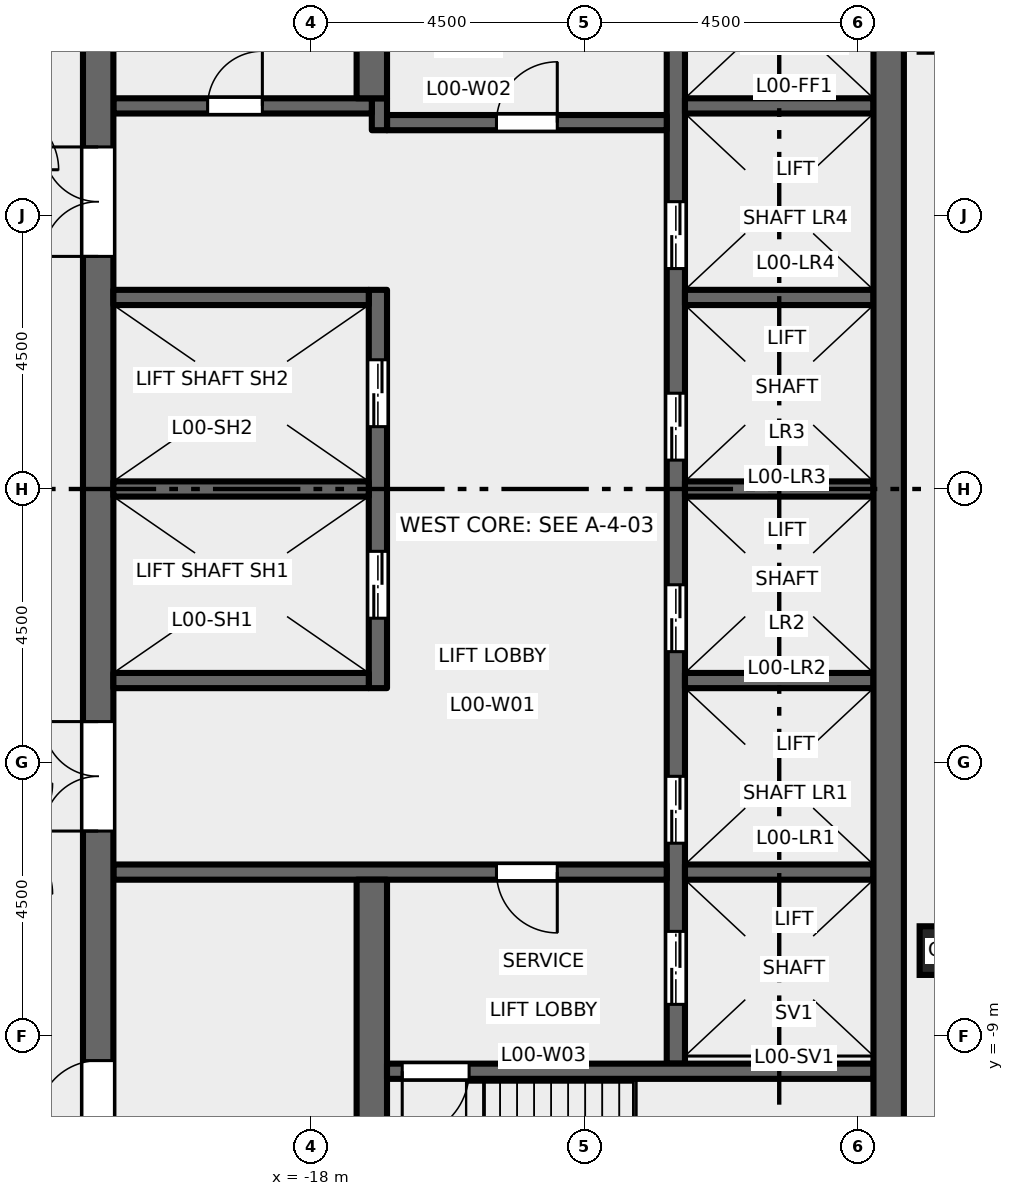
"""IFC4 building model, lengths in metres.
Left out: names, types, materials, properties, quantities, classifications, styles, units other than length and angle.
Written with IfcOpenShell. Run it as: python <this file> out.ifc"""

import sys

from ifc_helpers import new_model, si_unit, direction, frame, frame_2d, origin, origin_2d, place, context, subcontext, project, spatial, rectangle, hollow_rectangle, extrude, element, fill, save


model = new_model("IFC4")
c1 = context("Model", 3, precision=1e-05, world=origin(), true_north=direction((0.0, 1.0)))
c2 = subcontext(c1, "Body", "Model", "MODEL_VIEW")
j1 = project(units=[si_unit("LENGTHUNIT", "METRE"), si_unit("PLANEANGLEUNIT", "RADIAN")], contexts=[c1])
p1 = place(None, origin())
s1 = spatial("IfcSite", under=j1, at=p1, CompositionType="ELEMENT")
p2 = place(p1, origin())
s2 = spatial("IfcBuilding", under=s1, at=p2, CompositionType="ELEMENT")
p3 = place(p2, origin())
s3 = spatial("IfcBuildingStorey", under=s2, at=p3, CompositionType="ELEMENT", Elevation=0.0)
p4 = place(p3, frame((-7.591, -7.591, 0.0), z_axis=(0.0, 0.0, 1.0), x_axis=(1.0, 0.0, 0.0)))
e1 = element("IfcColumn", 1, at=p4, inside=s3, PredefinedType="COLUMN", context=c2, shape_type="SweptSolid", body=[
    extrude(hollow_rectangle(XDim=0.8, YDim=0.8, WallThickness=0.05, at=origin_2d()), origin(), (0.0, 0.0, 1.0), 7.2),
])
p5 = place(p3, frame((-12.0, -9.45, 0.0), z_axis=(0.0, 0.0, 1.0), x_axis=(0.0, 1.0, 0.0)))
e2 = element("IfcWall", 2, at=p5, inside=s3, PredefinedType="SHEAR", context=c2, shape_type="SweptSolid", body=[
    extrude(rectangle(XDim=18.9, YDim=0.3, at=frame_2d((9.45, 0.0))), origin(), (0.0, 0.0, 1.0), 7.0),
])
p6 = place(p5, frame((3.625, 0.0, 0.0)))
e3 = element("IfcOpeningElement", 3, at=p6, cuts=e2, PredefinedType="OPENING", context=c2, shape_type="SweptSolid", body=[
    extrude(rectangle(XDim=1.1, YDim=2.1, at=frame_2d((0.55, 1.05))), frame((0.0, 0.16, 0.0), z_axis=(0.0, -1.0, 0.0), x_axis=(1.0, 0.0, 0.0)), (0.0, 0.0, 1.0), 0.32),
])
p7 = place(p5, frame((6.775, 0.0, 0.0)))
e4 = element("IfcOpeningElement", 4, at=p7, cuts=e2, PredefinedType="OPENING", context=c2, shape_type="SweptSolid", body=[
    extrude(rectangle(XDim=1.1, YDim=2.1, at=frame_2d((0.55, 1.05))), frame((0.0, 0.16, 0.0), z_axis=(0.0, -1.0, 0.0), x_axis=(1.0, 0.0, 0.0)), (0.0, 0.0, 1.0), 0.32),
])
p8 = place(p5, frame((9.925, 0.0, 0.0)))
e5 = element("IfcOpeningElement", 5, at=p8, cuts=e2, PredefinedType="OPENING", context=c2, shape_type="SweptSolid", body=[
    extrude(rectangle(XDim=1.1, YDim=2.1, at=frame_2d((0.55, 1.05))), frame((0.0, 0.16, 0.0), z_axis=(0.0, -1.0, 0.0), x_axis=(1.0, 0.0, 0.0)), (0.0, 0.0, 1.0), 0.32),
])
p9 = place(p5, frame((13.075, 0.0, 0.0)))
e6 = element("IfcOpeningElement", 6, at=p9, cuts=e2, PredefinedType="OPENING", context=c2, shape_type="SweptSolid", body=[
    extrude(rectangle(XDim=1.1, YDim=2.1, at=frame_2d((0.55, 1.05))), frame((0.0, 0.16, 0.0), z_axis=(0.0, -1.0, 0.0), x_axis=(1.0, 0.0, 0.0)), (0.0, 0.0, 1.0), 0.32),
])
p10 = place(p5, frame((16.725, 0.0, 0.0)))
e7 = element("IfcOpeningElement", 7, at=p10, cuts=e2, PredefinedType="OPENING", context=c2, shape_type="SweptSolid", body=[
    extrude(rectangle(XDim=1.2, YDim=2.1, at=frame_2d((0.6, 1.05))), frame((0.0, 0.16, 0.0), z_axis=(0.0, -1.0, 0.0), x_axis=(1.0, 0.0, 0.0)), (0.0, 0.0, 1.0), 0.32),
])
p11 = place(p5, frame((0.975, 0.0, 0.0)))
e8 = element("IfcOpeningElement", 8, at=p11, cuts=e2, PredefinedType="OPENING", context=c2, shape_type="SweptSolid", body=[
    extrude(rectangle(XDim=1.2, YDim=2.1, at=frame_2d((0.6, 1.05))), frame((0.0, 0.16, 0.0), z_axis=(0.0, -1.0, 0.0), x_axis=(1.0, 0.0, 0.0)), (0.0, 0.0, 1.0), 0.32),
])
p12 = place(p3, frame((-12.15, 6.025, 0.0), z_axis=(0.0, 0.0, 1.0), x_axis=(-1.0, 0.0, 0.0)))
e9 = element("IfcWall", 9, at=p12, inside=s3, PredefinedType="SHEAR", context=c2, shape_type="SweptSolid", body=[
    extrude(rectangle(XDim=4.6, YDim=0.25, at=frame_2d((2.3, 0.0))), origin(), (0.0, 0.0, 1.0), 7.0),
])
p13 = place(p12, frame((1.8, 0.0, 0.0)))
e10 = element("IfcOpeningElement", 10, at=p13, cuts=e9, PredefinedType="OPENING", context=c2, shape_type="SweptSolid", body=[
    extrude(rectangle(XDim=1.0, YDim=2.1, at=frame_2d((0.5, 1.05))), frame((0.0, 0.135, 0.0), z_axis=(0.0, -1.0, 0.0), x_axis=(1.0, 0.0, 0.0)), (0.0, 0.0, 1.0), 0.27),
])
p14 = place(p3, frame((-16.875, 5.9, 0.0), z_axis=(0.0, 0.0, 1.0), x_axis=(0.0, 1.0, 0.0)))
e11 = element("IfcWall", 11, at=p14, inside=s3, PredefinedType="SHEAR", context=c2, shape_type="SweptSolid", body=[
    extrude(rectangle(XDim=0.525, YDim=0.25, at=frame_2d((0.263, 0.0))), origin(), (0.0, 0.0, 1.0), 7.0),
])
p15 = place(p3, frame((-17.0, 6.3, 0.0), z_axis=(0.0, 0.0, 1.0), x_axis=(-1.0, 0.0, 0.0)))
e12 = element("IfcWall", 12, at=p15, inside=s3, PredefinedType="SHEAR", context=c2, shape_type="SweptSolid", body=[
    extrude(rectangle(XDim=4.25, YDim=0.25, at=frame_2d((2.125, 0.0))), origin(), (0.0, 0.0, 1.0), 7.0),
])
p16 = place(p15, frame((1.8, 0.0, 0.0)))
e13 = element("IfcOpeningElement", 13, at=p16, cuts=e12, PredefinedType="OPENING", context=c2, shape_type="SweptSolid", body=[
    extrude(rectangle(XDim=0.9, YDim=2.1, at=frame_2d((0.45, 1.05))), frame((0.0, 0.135, 0.0), z_axis=(0.0, -1.0, 0.0), x_axis=(1.0, 0.0, 0.0)), (0.0, 0.0, 1.0), 0.27),
])
p17 = place(p3, frame((-12.15, -6.3, 0.0), z_axis=(0.0, 0.0, 1.0), x_axis=(-1.0, 0.0, 0.0)))
e14 = element("IfcWall", 14, at=p17, inside=s3, PredefinedType="SHEAR", context=c2, shape_type="SweptSolid", body=[
    extrude(rectangle(XDim=9.1, YDim=0.25, at=frame_2d((4.55, 0.0))), origin(), (0.0, 0.0, 1.0), 7.0),
])
p18 = place(p17, frame((1.8, 0.0, 0.0)))
e15 = element("IfcOpeningElement", 15, at=p18, cuts=e14, PredefinedType="OPENING", context=c2, shape_type="SweptSolid", body=[
    extrude(rectangle(XDim=1.0, YDim=2.1, at=frame_2d((0.5, 1.05))), frame((0.0, 0.135, 0.0), z_axis=(0.0, -1.0, 0.0), x_axis=(1.0, 0.0, 0.0)), (0.0, 0.0, 1.0), 0.27),
])
p19 = place(p3, frame((-21.5, -13.0, 0.0), z_axis=(0.0, 0.0, 1.0), x_axis=(0.0, 1.0, 0.0)))
e16 = element("IfcWall", 16, at=p19, inside=s3, PredefinedType="SHEAR", context=c2, shape_type="SweptSolid", body=[
    extrude(rectangle(XDim=26.0, YDim=0.5, at=frame_2d((13.0, 0.0))), origin(), (0.0, 0.0, 1.0), 7.0),
])
p20 = place(p19, frame((16.825, 0.0, 0.0)))
e17 = element("IfcOpeningElement", 17, at=p20, cuts=e16, PredefinedType="OPENING", context=c2, shape_type="SweptSolid", body=[
    extrude(rectangle(XDim=1.8, YDim=2.1, at=frame_2d((0.9, 1.05))), frame((0.0, 0.26, 0.0), z_axis=(0.0, -1.0, 0.0), x_axis=(1.0, 0.0, 0.0)), (0.0, 0.0, 1.0), 0.52),
])
p21 = place(p19, frame((7.375, 0.0, 0.0)))
e18 = element("IfcOpeningElement", 18, at=p21, cuts=e16, PredefinedType="OPENING", context=c2, shape_type="SweptSolid", body=[
    extrude(rectangle(XDim=1.8, YDim=2.1, at=frame_2d((0.9, 1.05))), frame((0.0, 0.26, 0.0), z_axis=(0.0, -1.0, 0.0), x_axis=(1.0, 0.0, 0.0)), (0.0, 0.0, 1.0), 0.52),
])
p22 = place(p19, frame((2.6, 0.0, 0.0)))
e19 = element("IfcOpeningElement", 19, at=p22, cuts=e16, PredefinedType="OPENING", context=c2, shape_type="SweptSolid", body=[
    extrude(rectangle(XDim=1.0, YDim=2.1, at=frame_2d((0.5, 1.05))), frame((0.0, 0.26, 0.0), z_axis=(0.0, -1.0, 0.0), x_axis=(1.0, 0.0, 0.0)), (0.0, 0.0, 1.0), 0.52),
])
p23 = place(p3, frame((-16.9, -3.275, 0.0), z_axis=(0.0, 0.0, 1.0), x_axis=(0.0, 1.0, 0.0)))
e20 = element("IfcWall", 20, at=p23, inside=s3, PredefinedType="SHEAR", context=c2, shape_type="SweptSolid", body=[
    extrude(rectangle(XDim=6.55, YDim=0.3, at=frame_2d((3.275, 0.0))), origin(), (0.0, 0.0, 1.0), 7.0),
])
p24 = place(p23, frame((1.15, 0.0, 0.0)))
e21 = element("IfcOpeningElement", 21, at=p24, cuts=e20, PredefinedType="OPENING", context=c2, shape_type="SweptSolid", body=[
    extrude(rectangle(XDim=1.1, YDim=2.1, at=frame_2d((0.55, 1.05))), frame((0.0, 0.16, 0.0), z_axis=(0.0, -1.0, 0.0), x_axis=(1.0, 0.0, 0.0)), (0.0, 0.0, 1.0), 0.32),
])
p25 = place(p23, frame((4.3, 0.0, 0.0)))
e22 = element("IfcOpeningElement", 22, at=p25, cuts=e20, PredefinedType="OPENING", context=c2, shape_type="SweptSolid", body=[
    extrude(rectangle(XDim=1.1, YDim=2.1, at=frame_2d((0.55, 1.05))), frame((0.0, 0.16, 0.0), z_axis=(0.0, -1.0, 0.0), x_axis=(1.0, 0.0, 0.0)), (0.0, 0.0, 1.0), 0.32),
])
for number, where, z_axis, x_axis in (
    (23, (-17.05, 0.0, 0.0), (0.0, 0.0, 1.0), (-1.0, 0.0, 0.0)),
    (24, (-17.05, 3.15, 0.0), (0.0, 0.0, 1.0), (-1.0, 0.0, 0.0)),
    (25, (-17.05, -3.15, 0.0), (0.0, 0.0, 1.0), (-1.0, 0.0, 0.0)),
):
    element("IfcWall", number, at=place(p3, frame(where, z_axis=z_axis, x_axis=x_axis)), inside=s3, PredefinedType="SHEAR", context=c2, shape_type="SweptSolid", body=[
        extrude(rectangle(XDim=4.2, YDim=0.25, at=frame_2d((2.1, 0.0))), origin(), (0.0, 0.0, 1.0), 7.0),
    ])
for number, where, z_axis, x_axis in (
    (26, (-17.0, 6.425, 0.0), (0.0, 0.0, 1.0), (0.0, 1.0, 0.0)),
    (27, (-17.0, -13.0, 0.0), (0.0, 0.0, 1.0), (0.0, 1.0, 0.0)),
):
    element("IfcWall", number, at=place(p3, frame(where, z_axis=z_axis, x_axis=x_axis)), inside=s3, PredefinedType="SHEAR", context=c2, shape_type="SweptSolid", body=[
        extrude(rectangle(XDim=6.575, YDim=0.5, at=frame_2d((3.288, 0.0))), origin(), (0.0, 0.0, 1.0), 7.0),
    ])
for number, where, z_axis, x_axis in (
    (28, (-8.75, 0.0, 0.0), (0.0, 0.0, 1.0), (-1.0, 0.0, 0.0)),
    (29, (-8.75, 3.15, 0.0), (0.0, 0.0, 1.0), (-1.0, 0.0, 0.0)),
    (30, (-8.75, 6.3, 0.0), (0.0, 0.0, 1.0), (-1.0, 0.0, 0.0)),
    (31, (-8.75, -3.15, 0.0), (0.0, 0.0, 1.0), (-1.0, 0.0, 0.0)),
    (32, (-8.75, -6.3, 0.0), (0.0, 0.0, 1.0), (-1.0, 0.0, 0.0)),
):
    element("IfcWall", number, at=place(p3, frame(where, z_axis=z_axis, x_axis=x_axis)), inside=s3, PredefinedType="SHEAR", context=c2, shape_type="SweptSolid", body=[
        extrude(rectangle(XDim=3.1, YDim=0.25, at=frame_2d((1.55, 0.0))), origin(), (0.0, 0.0, 1.0), 7.0),
    ])
p26 = place(p3, frame((-8.75, -9.575, 0.0), z_axis=(0.0, 0.0, 1.0), x_axis=(-1.0, 0.0, 0.0)))
e33 = element("IfcWall", 33, at=p26, inside=s3, PredefinedType="SHEAR", context=c2, shape_type="SweptSolid", body=[
    extrude(rectangle(XDim=8.0, YDim=0.25, at=frame_2d((4.0, 0.0))), origin(), (0.0, 0.0, 1.0), 7.0),
])
p27 = place(p26, frame((6.65, 0.0, 0.0)))
e34 = element("IfcOpeningElement", 34, at=p27, cuts=e33, PredefinedType="OPENING", context=c2, shape_type="SweptSolid", body=[
    extrude(rectangle(XDim=1.1, YDim=2.1, at=frame_2d((0.55, 1.05))), frame((0.0, 0.135, 0.0), z_axis=(0.0, -1.0, 0.0), x_axis=(1.0, 0.0, 0.0)), (0.0, 0.0, 1.0), 0.27),
])
p28 = place(p3, frame((-8.5, -13.0, 0.0), z_axis=(0.0, 0.0, 1.0), x_axis=(0.0, 1.0, 0.0)))
e35 = element("IfcWall", 35, at=p28, inside=s3, PredefinedType="SHEAR", context=c2, shape_type="SweptSolid", body=[
    extrude(rectangle(XDim=26.0, YDim=0.5, at=frame_2d((13.0, 0.0))), origin(), (0.0, 0.0, 1.0), 7.0),
])
p29 = place(p13, origin())
e36 = element("IfcDoor", 36, at=p29, inside=s3, OperationType="SINGLE_SWING_LEFT", PredefinedType="DOOR", context=c2, shape_type="SweptSolid", body=[
    extrude(rectangle(XDim=1.0, YDim=2.1, at=frame_2d((0.5, 1.05))), frame((0.0, 0.025, 0.0), z_axis=(0.0, -1.0, 0.0), x_axis=(1.0, 0.0, 0.0)), (0.0, 0.0, 1.0), 0.05),
])
fill(e10, e36)
p30 = place(p18, origin())
e37 = element("IfcDoor", 37, at=p30, inside=s3, OperationType="SINGLE_SWING_RIGHT", PredefinedType="DOOR", context=c2, shape_type="SweptSolid", body=[
    extrude(rectangle(XDim=1.0, YDim=2.1, at=frame_2d((0.5, 1.05))), frame((0.0, 0.025, 0.0), z_axis=(0.0, -1.0, 0.0), x_axis=(1.0, 0.0, 0.0)), (0.0, 0.0, 1.0), 0.05),
])
fill(e15, e37)
p31 = place(p27, origin())
e38 = element("IfcDoor", 38, at=p31, inside=s3, OperationType="SINGLE_SWING_LEFT", PredefinedType="DOOR", context=c2, shape_type="SweptSolid", body=[
    extrude(rectangle(XDim=1.1, YDim=2.1, at=frame_2d((0.55, 1.05))), frame((0.0, 0.025, 0.0), z_axis=(0.0, -1.0, 0.0), x_axis=(1.0, 0.0, 0.0)), (0.0, 0.0, 1.0), 0.05),
])
fill(e34, e38)
p32 = place(p20, origin())
e39 = element("IfcDoor", 39, at=p32, inside=s3, OperationType="DOUBLE_DOOR_DOUBLE_SWING", PredefinedType="DOOR", context=c2, shape_type="SweptSolid", body=[
    extrude(rectangle(XDim=1.8, YDim=2.1, at=frame_2d((0.9, 1.05))), frame((0.0, 0.025, 0.0), z_axis=(0.0, -1.0, 0.0), x_axis=(1.0, 0.0, 0.0)), (0.0, 0.0, 1.0), 0.05),
])
fill(e17, e39)
p33 = place(p21, origin())
e40 = element("IfcDoor", 40, at=p33, inside=s3, OperationType="DOUBLE_DOOR_DOUBLE_SWING", PredefinedType="DOOR", context=c2, shape_type="SweptSolid", body=[
    extrude(rectangle(XDim=1.8, YDim=2.1, at=frame_2d((0.9, 1.05))), frame((0.0, 0.025, 0.0), z_axis=(0.0, -1.0, 0.0), x_axis=(1.0, 0.0, 0.0)), (0.0, 0.0, 1.0), 0.05),
])
fill(e18, e40)
p34 = place(p6, origin())
e41 = element("IfcDoor", 41, at=p34, inside=s3, OperationType="DOUBLE_DOOR_SLIDING", PredefinedType="DOOR", context=c2, shape_type="SweptSolid", body=[
    extrude(rectangle(XDim=1.1, YDim=2.1, at=frame_2d((0.55, 1.05))), frame((0.0, 0.025, 0.0), z_axis=(0.0, -1.0, 0.0), x_axis=(1.0, 0.0, 0.0)), (0.0, 0.0, 1.0), 0.05),
])
fill(e3, e41)
p35 = place(p7, origin())
e42 = element("IfcDoor", 42, at=p35, inside=s3, OperationType="DOUBLE_DOOR_SLIDING", PredefinedType="DOOR", context=c2, shape_type="SweptSolid", body=[
    extrude(rectangle(XDim=1.1, YDim=2.1, at=frame_2d((0.55, 1.05))), frame((0.0, 0.025, 0.0), z_axis=(0.0, -1.0, 0.0), x_axis=(1.0, 0.0, 0.0)), (0.0, 0.0, 1.0), 0.05),
])
fill(e4, e42)
p36 = place(p8, origin())
e43 = element("IfcDoor", 43, at=p36, inside=s3, OperationType="DOUBLE_DOOR_SLIDING", PredefinedType="DOOR", context=c2, shape_type="SweptSolid", body=[
    extrude(rectangle(XDim=1.1, YDim=2.1, at=frame_2d((0.55, 1.05))), frame((0.0, 0.025, 0.0), z_axis=(0.0, -1.0, 0.0), x_axis=(1.0, 0.0, 0.0)), (0.0, 0.0, 1.0), 0.05),
])
fill(e5, e43)
p37 = place(p9, origin())
e44 = element("IfcDoor", 44, at=p37, inside=s3, OperationType="DOUBLE_DOOR_SLIDING", PredefinedType="DOOR", context=c2, shape_type="SweptSolid", body=[
    extrude(rectangle(XDim=1.1, YDim=2.1, at=frame_2d((0.55, 1.05))), frame((0.0, 0.025, 0.0), z_axis=(0.0, -1.0, 0.0), x_axis=(1.0, 0.0, 0.0)), (0.0, 0.0, 1.0), 0.05),
])
fill(e6, e44)
p38 = place(p24, origin())
e45 = element("IfcDoor", 45, at=p38, inside=s3, OperationType="DOUBLE_DOOR_SLIDING", PredefinedType="DOOR", context=c2, shape_type="SweptSolid", body=[
    extrude(rectangle(XDim=1.1, YDim=2.1, at=frame_2d((0.55, 1.05))), frame((0.0, 0.025, 0.0), z_axis=(0.0, -1.0, 0.0), x_axis=(1.0, 0.0, 0.0)), (0.0, 0.0, 1.0), 0.05),
])
fill(e21, e45)
p39 = place(p25, origin())
e46 = element("IfcDoor", 46, at=p39, inside=s3, OperationType="DOUBLE_DOOR_SLIDING", PredefinedType="DOOR", context=c2, shape_type="SweptSolid", body=[
    extrude(rectangle(XDim=1.1, YDim=2.1, at=frame_2d((0.55, 1.05))), frame((0.0, 0.025, 0.0), z_axis=(0.0, -1.0, 0.0), x_axis=(1.0, 0.0, 0.0)), (0.0, 0.0, 1.0), 0.05),
])
fill(e22, e46)
p40 = place(p11, origin())
e47 = element("IfcDoor", 47, at=p40, inside=s3, OperationType="DOUBLE_DOOR_SLIDING", PredefinedType="DOOR", context=c2, shape_type="SweptSolid", body=[
    extrude(rectangle(XDim=1.2, YDim=2.1, at=frame_2d((0.6, 1.05))), frame((0.0, 0.025, 0.0), z_axis=(0.0, -1.0, 0.0), x_axis=(1.0, 0.0, 0.0)), (0.0, 0.0, 1.0), 0.05),
])
fill(e8, e47)
p41 = place(p16, origin())
e48 = element("IfcDoor", 48, at=p41, inside=s3, OperationType="SINGLE_SWING_LEFT", PredefinedType="DOOR", context=c2, shape_type="SweptSolid", body=[
    extrude(rectangle(XDim=0.9, YDim=2.1, at=frame_2d((0.45, 1.05))), frame((0.0, 0.025, 0.0), z_axis=(0.0, -1.0, 0.0), x_axis=(1.0, 0.0, 0.0)), (0.0, 0.0, 1.0), 0.05),
])
fill(e13, e48)
p42 = place(p22, origin())
e49 = element("IfcDoor", 49, at=p42, inside=s3, OperationType="SINGLE_SWING_RIGHT", PredefinedType="DOOR", context=c2, shape_type="SweptSolid", body=[
    extrude(rectangle(XDim=1.0, YDim=2.1, at=frame_2d((0.5, 1.05))), frame((0.0, 0.025, 0.0), z_axis=(0.0, -1.0, 0.0), x_axis=(1.0, 0.0, 0.0)), (0.0, 0.0, 1.0), 0.05),
])
fill(e19, e49)
save(model, sys.argv[1])
